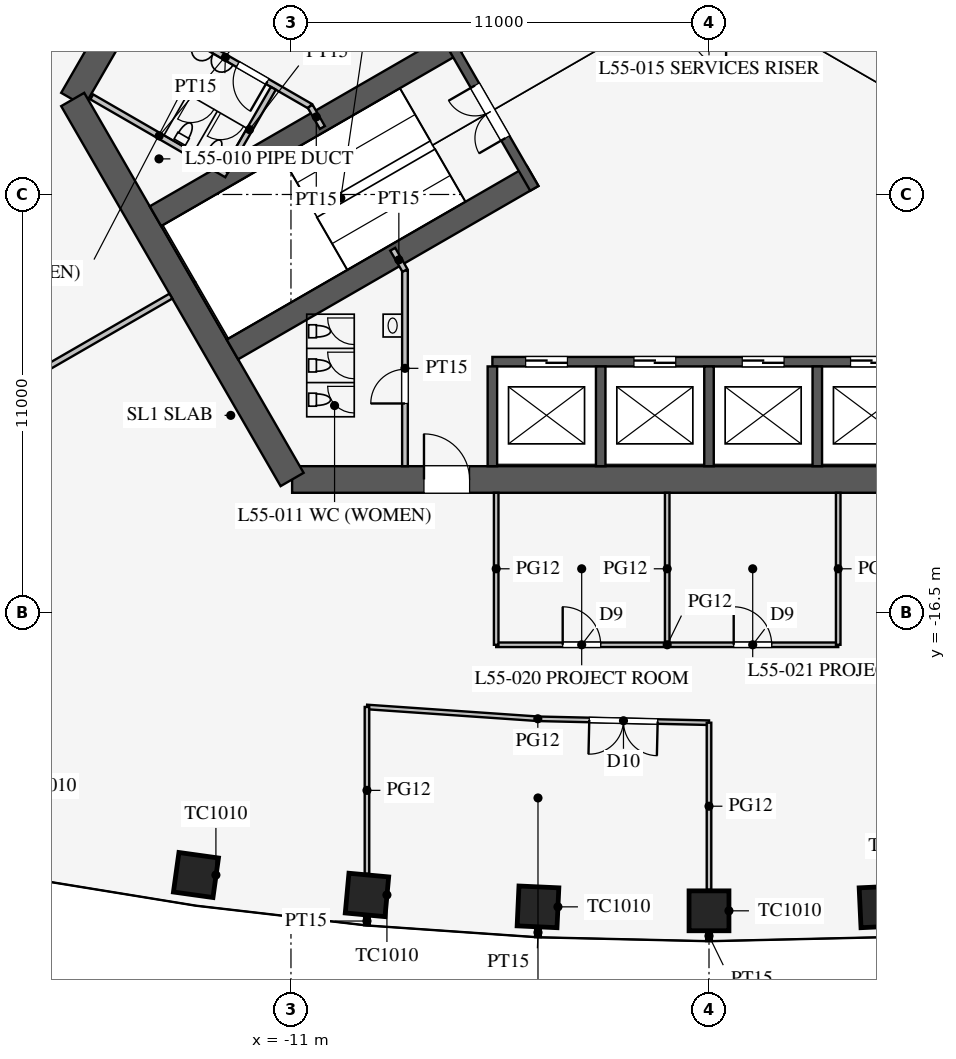
"""IFC4 building model, lengths in metres.
Left out: names, types, materials, properties, quantities, classifications, styles, units other than length and angle.
Written with IfcOpenShell. Run it as: python <this file> out.ifc"""

import sys

from ifc_helpers import new_model, si_unit, direction, frame, frame_2d, origin, origin_2d, place, context, subcontext, project, spatial, rectangle, extrude, element, fill, save


model = new_model("IFC4")
c1 = context("Model", 3, precision=1e-05, world=origin(), true_north=direction((0.0, 1.0)))
c2 = subcontext(c1, "Body", "Model", "MODEL_VIEW")
j1 = project(units=[si_unit("LENGTHUNIT", "METRE"), si_unit("PLANEANGLEUNIT", "RADIAN")], contexts=[c1])
p1 = place(None, origin())
s1 = spatial("IfcSite", under=j1, at=p1, CompositionType="ELEMENT")
p2 = place(p1, origin())
s2 = spatial("IfcBuilding", under=s1, at=p2, CompositionType="ELEMENT")
p3 = place(p2, frame((0.0, 0.0, 240.1)))
s3 = spatial("IfcBuildingStorey", under=s2, at=p3, CompositionType="ELEMENT", Elevation=240.1)
for number, where, z_axis, x_axis in (
    (1, (-13.5, -23.408, 0.0), (0.0, 0.0, 1.0), (0.99, -0.138, 0.0)),
    (2, (-9.0, -23.933, 0.0), (0.0, 0.0, 1.0), (0.996, -0.092, 0.0)),
    (3, (-4.5, -24.246, 0.0), (0.0, 0.0, 1.0), (0.999, -0.046, 0.0)),
    (4, (0.0, -24.351, 0.0), (0.0, 0.0, 1.0), (1.0, 0.0, 0.0)),
    (5, (4.5, -24.246, 0.0), (0.0, 0.0, 1.0), (0.999, 0.046, 0.0)),
):
    element("IfcColumn", number, at=place(p3, frame(where, z_axis=z_axis, x_axis=x_axis)), inside=s3, PredefinedType="COLUMN", context=c2, shape_type="SweptSolid", body=[
        extrude(rectangle(XDim=1.05, YDim=1.05, at=origin_2d()), origin(), (0.0, 0.0, 1.0), 4.2),
    ])
p4 = place(p3, frame((-10.97, -13.0, 0.0), z_axis=(0.0, 0.0, 1.0), x_axis=(1.0, 0.0, 0.0)))
e6 = element("IfcWall", 6, at=p4, inside=s3, PredefinedType="SHEAR", context=c2, shape_type="SweptSolid", body=[
    extrude(rectangle(XDim=21.939, YDim=0.7, at=frame_2d((10.97, 0.0))), origin(), (0.0, 0.0, 1.0), 4.2),
])
p5 = place(p4, frame((17.27, 0.0, 0.0)))
e7 = element("IfcOpeningElement", 7, at=p5, cuts=e6, PredefinedType="OPENING", context=c2, shape_type="SweptSolid", body=[
    extrude(rectangle(XDim=1.2, YDim=2.1, at=frame_2d((0.6, 1.05))), frame((0.0, 0.36, 0.0), z_axis=(0.0, -1.0, 0.0), x_axis=(1.0, 0.0, 0.0)), (0.0, 0.0, 1.0), 0.72),
])
p6 = place(p4, frame((3.47, 0.0, 0.0)))
e8 = element("IfcOpeningElement", 8, at=p6, cuts=e6, PredefinedType="OPENING", context=c2, shape_type="SweptSolid", body=[
    extrude(rectangle(XDim=1.2, YDim=2.1, at=frame_2d((0.6, 1.05))), frame((0.0, 0.36, 0.0), z_axis=(0.0, -1.0, 0.0), x_axis=(1.0, 0.0, 0.0)), (0.0, 0.0, 1.0), 0.72),
])
p7 = place(p3, frame((-5.773, 16.0, 0.0), z_axis=(0.0, 0.0, 1.0), x_axis=(-0.500002442456, -0.866023993627, 0.0)))
e9 = element("IfcWall", 9, at=p7, inside=s3, PredefinedType="SHEAR", context=c2, shape_type="SweptSolid", body=[
    extrude(rectangle(XDim=21.939, YDim=0.7, at=frame_2d((10.97, 0.0))), origin(), (0.0, 0.0, 1.0), 4.2),
])
p8 = place(p7, frame((17.27, 0.0, 0.0)))
e10 = element("IfcOpeningElement", 10, at=p8, cuts=e9, PredefinedType="OPENING", context=c2, shape_type="SweptSolid", body=[
    extrude(rectangle(XDim=1.2, YDim=2.1, at=frame_2d((0.6, 1.05))), frame((0.0, 0.36, 0.0), z_axis=(0.0, -1.0, 0.0), x_axis=(1.0, 0.0, 0.0)), (0.0, 0.0, 1.0), 0.72),
])
p9 = place(p7, frame((3.47, 0.0, 0.0)))
e11 = element("IfcOpeningElement", 11, at=p9, cuts=e9, PredefinedType="OPENING", context=c2, shape_type="SweptSolid", body=[
    extrude(rectangle(XDim=1.2, YDim=2.1, at=frame_2d((0.6, 1.05))), frame((0.0, 0.36, 0.0), z_axis=(0.0, -1.0, 0.0), x_axis=(1.0, 0.0, 0.0)), (0.0, 0.0, 1.0), 0.72),
])
p10 = place(p3, frame((-16.743, -3.0, 0.0), z_axis=(0.0, 0.0, 1.0), x_axis=(0.499995765644, -0.866027848477, 0.0)))
e12 = element("IfcWall", 12, at=p10, inside=s3, PredefinedType="SHEAR", context=c2, shape_type="SweptSolid", body=[
    extrude(rectangle(XDim=11.547, YDim=0.7, at=frame_2d((5.773, 0.0))), origin(), (0.0, 0.0, 1.0), 4.2),
])
p11 = place(p3, frame((-5.7, -9.9, 0.0), z_axis=(0.0, 0.0, 1.0), x_axis=(1.0, 0.0, 0.0)))
e13 = element("IfcWall", 13, at=p11, inside=s3, PredefinedType="SHEAR", context=c2, shape_type="SweptSolid", body=[
    extrude(rectangle(XDim=11.4, YDim=0.25, at=frame_2d((5.7, 0.0))), origin(), (0.0, 0.0, 1.0), 4.2),
])
p12 = place(p11, frame((0.875, 0.0, 0.0)))
e14 = element("IfcOpeningElement", 14, at=p12, cuts=e13, PredefinedType="OPENING", context=c2, shape_type="SweptSolid", body=[
    extrude(rectangle(XDim=1.1, YDim=2.2, at=frame_2d((0.55, 1.1))), frame((0.0, 0.135, 0.0), z_axis=(0.0, -1.0, 0.0), x_axis=(1.0, 0.0, 0.0)), (0.0, 0.0, 1.0), 0.27),
])
p13 = place(p11, frame((3.725, 0.0, 0.0)))
e15 = element("IfcOpeningElement", 15, at=p13, cuts=e13, PredefinedType="OPENING", context=c2, shape_type="SweptSolid", body=[
    extrude(rectangle(XDim=1.1, YDim=2.2, at=frame_2d((0.55, 1.1))), frame((0.0, 0.135, 0.0), z_axis=(0.0, -1.0, 0.0), x_axis=(1.0, 0.0, 0.0)), (0.0, 0.0, 1.0), 0.27),
])
p14 = place(p11, frame((6.575, 0.0, 0.0)))
e16 = element("IfcOpeningElement", 16, at=p14, cuts=e13, PredefinedType="OPENING", context=c2, shape_type="SweptSolid", body=[
    extrude(rectangle(XDim=1.1, YDim=2.2, at=frame_2d((0.55, 1.1))), frame((0.0, 0.135, 0.0), z_axis=(0.0, -1.0, 0.0), x_axis=(1.0, 0.0, 0.0)), (0.0, 0.0, 1.0), 0.27),
])
p15 = place(p11, frame((9.425, 0.0, 0.0)))
e17 = element("IfcOpeningElement", 17, at=p15, cuts=e13, PredefinedType="OPENING", context=c2, shape_type="SweptSolid", body=[
    extrude(rectangle(XDim=1.1, YDim=2.2, at=frame_2d((0.55, 1.1))), frame((0.0, 0.135, 0.0), z_axis=(0.0, -1.0, 0.0), x_axis=(1.0, 0.0, 0.0)), (0.0, 0.0, 1.0), 0.27),
])
for number, where, z_axis, x_axis in (
    (18, (-5.7, -10.025, 0.0), (0.0, 0.0, 1.0), (0.0, -1.0, 0.0)),
    (19, (-2.85, -10.025, 0.0), (0.0, 0.0, 1.0), (0.0, -1.0, 0.0)),
    (20, (0.0, -10.025, 0.0), (0.0, 0.0, 1.0), (0.0, -1.0, 0.0)),
    (21, (2.85, -10.025, 0.0), (0.0, 0.0, 1.0), (0.0, -1.0, 0.0)),
):
    element("IfcWall", number, at=place(p3, frame(where, z_axis=z_axis, x_axis=x_axis)), inside=s3, PredefinedType="SHEAR", context=c2, shape_type="SweptSolid", body=[
        extrude(rectangle(XDim=2.625, YDim=0.25, at=frame_2d((1.312, 0.0))), origin(), (0.0, 0.0, 1.0), 4.2),
    ])
for number, where, z_axis, x_axis in (
    (22, (-6.663, -1.509, 0.0), (0.0, 0.0, 1.0), (-0.866, -0.5, 0.0)),
    (23, (-4.638, -5.016, 0.0), (0.0, 0.0, 1.0), (-0.866, -0.5, 0.0)),
):
    element("IfcWall", number, at=place(p3, frame(where, z_axis=z_axis, x_axis=x_axis)), inside=s3, PredefinedType="SHEAR", context=c2, shape_type="SweptSolid", body=[
        extrude(rectangle(XDim=9.125, YDim=0.6, at=frame_2d((4.562, 0.0))), origin(), (0.0, 0.0, 1.0), 4.2),
    ])
p16 = place(p3, frame((-6.922, -1.312, 0.0), z_axis=(0.0, 0.0, 1.0), x_axis=(0.499984536904, -0.866034331223, 0.0)))
e24 = element("IfcWall", 24, at=p16, inside=s3, PredefinedType="SHEAR", context=c2, shape_type="SweptSolid", body=[
    extrude(rectangle(XDim=4.65, YDim=0.25, at=frame_2d((2.325, 0.0))), origin(), (0.0, 0.0, 1.0), 4.2),
])
p17 = place(p16, frame((1.525, 0.0, 0.0)))
e25 = element("IfcOpeningElement", 25, at=p17, cuts=e24, PredefinedType="OPENING", context=c2, shape_type="SweptSolid", body=[
    extrude(rectangle(XDim=1.6, YDim=2.1, at=frame_2d((0.8, 1.05))), frame((0.0, 0.135, 0.0), z_axis=(0.0, -1.0, 0.0), x_axis=(1.0, 0.0, 0.0)), (0.0, 0.0, 1.0), 0.27),
])
p18 = place(p3, frame((-8.0, -7.5, 0.0), z_axis=(0.0, 0.0, 1.0), x_axis=(0.0, -1.0, 0.0)))
e26 = element("IfcWall", 26, at=p18, inside=s3, PredefinedType="PARTITIONING", context=c2, shape_type="SweptSolid", body=[
    extrude(rectangle(XDim=5.15, YDim=0.15, at=frame_2d((2.575, 0.0))), origin(), (0.0, 0.0, 1.0), 4.0),
])
p19 = place(p18, frame((2.6, 0.0, 0.0)))
e27 = element("IfcOpeningElement", 27, at=p19, cuts=e26, PredefinedType="OPENING", context=c2, shape_type="SweptSolid", body=[
    extrude(rectangle(XDim=0.9, YDim=2.1, at=frame_2d((0.45, 1.05))), frame((0.0, 0.085, 0.0), z_axis=(0.0, -1.0, 0.0), x_axis=(1.0, 0.0, 0.0)), (0.0, 0.0, 1.0), 0.17),
])
p20 = place(p3, frame((-10.495, -3.178, 0.0), z_axis=(0.0, 0.0, 1.0), x_axis=(-0.866037967349, 0.499978238636, 0.0)))
e28 = element("IfcWall", 28, at=p20, inside=s3, PredefinedType="PARTITIONING", context=c2, shape_type="SweptSolid", body=[
    extrude(rectangle(XDim=5.15, YDim=0.15, at=frame_2d((2.575, 0.0))), origin(), (0.0, 0.0, 1.0), 4.0),
])
p21 = place(p20, frame((1.3, 0.0, 0.0)))
e29 = element("IfcOpeningElement", 29, at=p21, cuts=e28, PredefinedType="OPENING", context=c2, shape_type="SweptSolid", body=[
    extrude(rectangle(XDim=0.9, YDim=2.1, at=frame_2d((0.45, 1.05))), frame((0.0, 0.085, 0.0), z_axis=(0.0, -1.0, 0.0), x_axis=(1.0, 0.0, 0.0)), (0.0, 0.0, 1.0), 0.17),
])
for number, where, z_axis, x_axis in (
    (30, (-10.495, -3.178, 0.0), (0.0, 0.0, 1.0), (0.5, -0.866, 0.0)),
    (31, (-8.0, -7.5, 0.0), (0.0, 0.0, 1.0), (-0.5, 0.866, 0.0)),
):
    element("IfcWall", number, at=place(p3, frame(where, z_axis=z_axis, x_axis=x_axis)), inside=s3, PredefinedType="PARTITIONING", context=c2, shape_type="SweptSolid", body=[
        extrude(rectangle(XDim=0.645, YDim=0.15, at=frame_2d((0.323, 0.0))), origin(), (0.0, 0.0, 1.0), 4.0),
    ])
p22 = place(p3, frame((-12.691, -4.982, 0.0), z_axis=(0.0, 0.0, 1.0), x_axis=(-0.8660249478, 0.500000789788, 0.0)))
e32 = element("IfcWall", 32, at=p22, inside=s3, PredefinedType="PARTITIONING", context=c2, shape_type="SweptSolid", body=[
    extrude(rectangle(XDim=4.1, YDim=0.15, at=frame_2d((2.05, 0.0))), origin(), (0.0, 0.0, 1.0), 4.0),
])
p23 = place(p3, frame((-11.464, -2.706, 0.0), z_axis=(0.0, 0.0, 1.0), x_axis=(-0.50001992892, -0.866013897511, 0.0)))
e33 = element("IfcWall", 33, at=p23, inside=s3, PredefinedType="PARTITIONING", context=c2, shape_type="SweptSolid", body=[
    extrude(rectangle(XDim=2.51, YDim=0.15, at=frame_2d((1.255, 0.0))), origin(), (0.0, 0.0, 1.0), 4.0),
])
p24 = place(p3, frame((-14.159, -8.175, 0.0), z_axis=(0.0, 0.0, 1.0), x_axis=(-0.866027028085, -0.499997186618, 0.0)))
e34 = element("IfcWall", 34, at=p24, inside=s3, PredefinedType="PARTITIONING", context=c2, shape_type="SweptSolid", body=[
    extrude(rectangle(XDim=15.0, YDim=0.15, at=frame_2d((7.5, 0.0))), origin(), (0.0, 0.0, 1.0), 2.4),
])
p25 = place(p3, frame((-1.1, -17.35, 0.0), z_axis=(0.0, 0.0, 1.0), x_axis=(1.0, 0.0, 0.0)))
e35 = element("IfcWall", 35, at=p25, inside=s3, PredefinedType="PARTITIONING", context=c2, shape_type="SweptSolid", body=[
    extrude(rectangle(XDim=4.5, YDim=0.12, at=frame_2d((2.25, 0.0))), origin(), (0.0, 0.0, 1.0), 2.9),
])
p26 = place(p25, frame((1.75, 0.0, 0.15)))
e36 = element("IfcOpeningElement", 36, at=p26, cuts=e35, PredefinedType="OPENING", context=c2, shape_type="SweptSolid", body=[
    extrude(rectangle(XDim=1.0, YDim=2.1, at=frame_2d((0.5, 1.05))), frame((0.0, 0.07, 0.0), z_axis=(0.0, -1.0, 0.0), x_axis=(1.0, 0.0, 0.0)), (0.0, 0.0, 1.0), 0.14),
])
p27 = place(p3, frame((-5.6, -17.35, 0.0), z_axis=(0.0, 0.0, 1.0), x_axis=(1.0, 0.0, 0.0)))
e37 = element("IfcWall", 37, at=p27, inside=s3, PredefinedType="PARTITIONING", context=c2, shape_type="SweptSolid", body=[
    extrude(rectangle(XDim=4.5, YDim=0.12, at=frame_2d((2.25, 0.0))), origin(), (0.0, 0.0, 1.0), 2.9),
])
p28 = place(p27, frame((1.75, 0.0, 0.15)))
e38 = element("IfcOpeningElement", 38, at=p28, cuts=e37, PredefinedType="OPENING", context=c2, shape_type="SweptSolid", body=[
    extrude(rectangle(XDim=1.0, YDim=2.1, at=frame_2d((0.5, 1.05))), frame((0.0, 0.07, 0.0), z_axis=(0.0, -1.0, 0.0), x_axis=(1.0, 0.0, 0.0)), (0.0, 0.0, 1.0), 0.14),
])
for number, where, z_axis, x_axis in (
    (39, (3.4, -13.35, 0.0), (0.0, 0.0, 1.0), (0.0, -1.0, 0.0)),
    (40, (-1.1, -13.35, 0.0), (0.0, 0.0, 1.0), (0.0, -1.0, 0.0)),
    (41, (-5.6, -13.35, 0.0), (0.0, 0.0, 1.0), (0.0, -1.0, 0.0)),
):
    element("IfcWall", number, at=place(p3, frame(where, z_axis=z_axis, x_axis=x_axis)), inside=s3, PredefinedType="PARTITIONING", context=c2, shape_type="SweptSolid", body=[
        extrude(rectangle(XDim=4.0, YDim=0.12, at=frame_2d((2.0, 0.0))), origin(), (0.0, 0.0, 1.0), 2.9),
    ])
p29 = place(p3, frame((0.0, -24.88, 0.0), z_axis=(0.0, 0.0, 1.0), x_axis=(0.0, -1.0, 0.0)))
e42 = element("IfcWall", 42, at=p29, inside=s3, PredefinedType="PARTITIONING", context=c2, shape_type="SweptSolid", body=[
    extrude(rectangle(XDim=0.266, YDim=0.15, at=frame_2d((0.133, 0.0))), origin(), (0.0, 0.0, 1.0), 2.9),
])
p30 = place(p3, frame((-4.5, -24.799, 0.0), z_axis=(0.0, 0.0, 1.0), x_axis=(0.0, -1.0, 0.0)))
e43 = element("IfcWall", 43, at=p30, inside=s3, PredefinedType="PARTITIONING", context=c2, shape_type="SweptSolid", body=[
    extrude(rectangle(XDim=0.243, YDim=0.15, at=frame_2d((0.122, 0.0))), origin(), (0.0, 0.0, 1.0), 2.9),
])
p31 = place(p3, frame((-9.0, -24.508, 0.0), z_axis=(0.0, 0.0, 1.0), x_axis=(0.0, -1.0, 0.0)))
e44 = element("IfcWall", 44, at=p31, inside=s3, PredefinedType="PARTITIONING", context=c2, shape_type="SweptSolid", body=[
    extrude(rectangle(XDim=0.223, YDim=0.15, at=frame_2d((0.112, 0.0))), origin(), (0.0, 0.0, 1.0), 2.9),
])
p32 = place(p3, frame((-4.5, -19.297, 0.0), z_axis=(0.0, 0.0, 1.0), x_axis=(0.99973552509, -0.022997388381, 0.0)))
e45 = element("IfcWall", 45, at=p32, inside=s3, PredefinedType="PARTITIONING", context=c2, shape_type="SweptSolid", body=[
    extrude(rectangle(XDim=4.501, YDim=0.12, at=frame_2d((2.25, 0.0))), origin(), (0.0, 0.0, 1.0), 2.9),
])
p33 = place(p32, frame((1.35, 0.0, 0.15)))
e46 = element("IfcOpeningElement", 46, at=p33, cuts=e45, PredefinedType="OPENING", context=c2, shape_type="SweptSolid", body=[
    extrude(rectangle(XDim=1.8, YDim=2.1, at=frame_2d((0.9, 1.05))), frame((0.0, 0.07, 0.0), z_axis=(0.0, -1.0, 0.0), x_axis=(1.0, 0.0, 0.0)), (0.0, 0.0, 1.0), 0.14),
])
p34 = place(p3, frame((-9.0, -18.986, 0.0), z_axis=(0.0, 0.0, 1.0), x_axis=(0.997623533978, -0.068900540297, 0.0)))
e47 = element("IfcWall", 47, at=p34, inside=s3, PredefinedType="PARTITIONING", context=c2, shape_type="SweptSolid", body=[
    extrude(rectangle(XDim=4.511, YDim=0.12, at=frame_2d((2.255, 0.0))), origin(), (0.0, 0.0, 1.0), 2.9),
])
p35 = place(p3, frame((0.0, -19.401, 0.0), z_axis=(0.0, 0.0, 1.0), x_axis=(0.0, -1.0, 0.0)))
e48 = element("IfcWall", 48, at=p35, inside=s3, PredefinedType="PARTITIONING", context=c2, shape_type="SweptSolid", body=[
    extrude(rectangle(XDim=4.395, YDim=0.12, at=frame_2d((2.198, 0.0))), origin(), (0.0, 0.0, 1.0), 2.9),
])
p36 = place(p3, frame((-9.0, -18.986, 0.0), z_axis=(0.0, 0.0, 1.0), x_axis=(0.0, -1.0, 0.0)))
e49 = element("IfcWall", 49, at=p36, inside=s3, PredefinedType="PARTITIONING", context=c2, shape_type="SweptSolid", body=[
    extrude(rectangle(XDim=4.389, YDim=0.12, at=frame_2d((2.195, 0.0))), origin(), (0.0, 0.0, 1.0), 2.9),
])
p37 = place(p3, frame((26.328, -15.182, 0.0), z_axis=(0.0, 0.0, 1.0), x_axis=(-0.500000626146, 0.866025042278, 0.0)))
e50 = element("IfcWall", 50, at=p37, inside=s3, PredefinedType="PARTITIONING", context=c2, shape_type="SweptSolid", body=[
    extrude(rectangle(XDim=52.624, YDim=0.12, at=frame_2d((26.312, 0.0))), origin(), (0.0, 0.0, 1.0), 2.9),
])
p38 = place(p37, frame((10.15, 0.0, 0.15)))
e51 = element("IfcOpeningElement", 51, at=p38, cuts=e50, PredefinedType="OPENING", context=c2, shape_type="SweptSolid", body=[
    extrude(rectangle(XDim=1.8, YDim=2.1, at=frame_2d((0.9, 1.05))), frame((0.0, 0.07, 0.0), z_axis=(0.0, -1.0, 0.0), x_axis=(1.0, 0.0, 0.0)), (0.0, 0.0, 1.0), 0.14),
])
p39 = place(p37, frame((40.65, 0.0, 0.15)))
e52 = element("IfcOpeningElement", 52, at=p39, cuts=e50, PredefinedType="OPENING", context=c2, shape_type="SweptSolid", body=[
    extrude(rectangle(XDim=1.8, YDim=2.1, at=frame_2d((0.9, 1.05))), frame((0.0, 0.07, 0.0), z_axis=(0.0, -1.0, 0.0), x_axis=(1.0, 0.0, 0.0)), (0.0, 0.0, 1.0), 0.14),
])
p40 = place(p3, frame((-0.016, 30.392, 0.0), z_axis=(0.0, 0.0, 1.0), x_axis=(-0.500000626146, -0.866025042278, 0.0)))
e53 = element("IfcWall", 53, at=p40, inside=s3, PredefinedType="PARTITIONING", context=c2, shape_type="SweptSolid", body=[
    extrude(rectangle(XDim=52.624, YDim=0.12, at=frame_2d((26.312, 0.0))), origin(), (0.0, 0.0, 1.0), 2.9),
])
p41 = place(p40, frame((10.15, 0.0, 0.15)))
e54 = element("IfcOpeningElement", 54, at=p41, cuts=e53, PredefinedType="OPENING", context=c2, shape_type="SweptSolid", body=[
    extrude(rectangle(XDim=1.8, YDim=2.1, at=frame_2d((0.9, 1.05))), frame((0.0, 0.07, 0.0), z_axis=(0.0, -1.0, 0.0), x_axis=(1.0, 0.0, 0.0)), (0.0, 0.0, 1.0), 0.14),
])
p42 = place(p40, frame((40.65, 0.0, 0.15)))
e55 = element("IfcOpeningElement", 55, at=p42, cuts=e53, PredefinedType="OPENING", context=c2, shape_type="SweptSolid", body=[
    extrude(rectangle(XDim=1.8, YDim=2.1, at=frame_2d((0.9, 1.05))), frame((0.0, 0.07, 0.0), z_axis=(0.0, -1.0, 0.0), x_axis=(1.0, 0.0, 0.0)), (0.0, 0.0, 1.0), 0.14),
])
p43 = place(p19, frame((0.9, 0.0, 0.0), z_axis=(0.0, 0.0, 1.0), x_axis=(-1.0, 0.0, 0.0)))
e56 = element("IfcDoor", 56, at=p43, inside=s3, OperationType="SINGLE_SWING_LEFT", PredefinedType="DOOR", context=c2, shape_type="SweptSolid", body=[
    extrude(rectangle(XDim=0.9, YDim=2.1, at=frame_2d((0.45, 1.05))), frame((0.0, 0.025, 0.0), z_axis=(0.0, -1.0, 0.0), x_axis=(1.0, 0.0, 0.0)), (0.0, 0.0, 1.0), 0.05),
])
fill(e27, e56)
p44 = place(p21, origin())
e57 = element("IfcDoor", 57, at=p44, inside=s3, OperationType="SINGLE_SWING_LEFT", PredefinedType="DOOR", context=c2, shape_type="SweptSolid", body=[
    extrude(rectangle(XDim=0.9, YDim=2.1, at=frame_2d((0.45, 1.05))), frame((0.0, 0.025, 0.0), z_axis=(0.0, -1.0, 0.0), x_axis=(1.0, 0.0, 0.0)), (0.0, 0.0, 1.0), 0.05),
])
fill(e29, e57)
p45 = place(p17, frame((1.6, 0.0, 0.0), z_axis=(0.0, 0.0, 1.0), x_axis=(-1.0, 0.0, 0.0)))
e58 = element("IfcDoor", 58, at=p45, inside=s3, OperationType="DOUBLE_DOOR_SINGLE_SWING", PredefinedType="DOOR", context=c2, shape_type="SweptSolid", body=[
    extrude(rectangle(XDim=1.6, YDim=2.1, at=frame_2d((0.8, 1.05))), frame((0.0, 0.025, 0.0), z_axis=(0.0, -1.0, 0.0), x_axis=(1.0, 0.0, 0.0)), (0.0, 0.0, 1.0), 0.05),
])
fill(e25, e58)
p46 = place(p6, origin())
e59 = element("IfcDoor", 59, at=p46, inside=s3, OperationType="SINGLE_SWING_LEFT", PredefinedType="DOOR", context=c2, shape_type="SweptSolid", body=[
    extrude(rectangle(XDim=1.2, YDim=2.1, at=frame_2d((0.6, 1.05))), frame((0.0, 0.025, 0.0), z_axis=(0.0, -1.0, 0.0), x_axis=(1.0, 0.0, 0.0)), (0.0, 0.0, 1.0), 0.05),
])
fill(e8, e59)
p47 = place(p28, origin())
e60 = element("IfcDoor", 60, at=p47, inside=s3, OperationType="SINGLE_SWING_LEFT", PredefinedType="DOOR", context=c2, shape_type="SweptSolid", body=[
    extrude(rectangle(XDim=1.0, YDim=2.1, at=frame_2d((0.5, 1.05))), frame((0.0, 0.025, 0.0), z_axis=(0.0, -1.0, 0.0), x_axis=(1.0, 0.0, 0.0)), (0.0, 0.0, 1.0), 0.05),
])
fill(e38, e60)
p48 = place(p26, origin())
e61 = element("IfcDoor", 61, at=p48, inside=s3, OperationType="SINGLE_SWING_LEFT", PredefinedType="DOOR", context=c2, shape_type="SweptSolid", body=[
    extrude(rectangle(XDim=1.0, YDim=2.1, at=frame_2d((0.5, 1.05))), frame((0.0, 0.025, 0.0), z_axis=(0.0, -1.0, 0.0), x_axis=(1.0, 0.0, 0.0)), (0.0, 0.0, 1.0), 0.05),
])
fill(e36, e61)
p49 = place(p33, frame((1.8, 0.0, 0.0), z_axis=(0.0, 0.0, 1.0), x_axis=(-1.0, 0.0, 0.0)))
e62 = element("IfcDoor", 62, at=p49, inside=s3, OperationType="DOUBLE_DOOR_SINGLE_SWING", PredefinedType="DOOR", context=c2, shape_type="SweptSolid", body=[
    extrude(rectangle(XDim=1.8, YDim=2.1, at=frame_2d((0.9, 1.05))), frame((0.0, 0.025, 0.0), z_axis=(0.0, -1.0, 0.0), x_axis=(1.0, 0.0, 0.0)), (0.0, 0.0, 1.0), 0.05),
])
fill(e46, e62)
p50 = place(p12, origin())
e63 = element("IfcDoor", 63, at=p50, inside=s3, OperationType="DOUBLE_DOOR_SLIDING", PredefinedType="DOOR", context=c2, shape_type="SweptSolid", body=[
    extrude(rectangle(XDim=1.1, YDim=2.2, at=frame_2d((0.55, 1.1))), frame((0.0, 0.025, 0.0), z_axis=(0.0, -1.0, 0.0), x_axis=(1.0, 0.0, 0.0)), (0.0, 0.0, 1.0), 0.05),
])
fill(e14, e63)
p51 = place(p13, origin())
e64 = element("IfcDoor", 64, at=p51, inside=s3, OperationType="DOUBLE_DOOR_SLIDING", PredefinedType="DOOR", context=c2, shape_type="SweptSolid", body=[
    extrude(rectangle(XDim=1.1, YDim=2.2, at=frame_2d((0.55, 1.1))), frame((0.0, 0.025, 0.0), z_axis=(0.0, -1.0, 0.0), x_axis=(1.0, 0.0, 0.0)), (0.0, 0.0, 1.0), 0.05),
])
fill(e15, e64)
p52 = place(p14, origin())
e65 = element("IfcDoor", 65, at=p52, inside=s3, OperationType="DOUBLE_DOOR_SLIDING", PredefinedType="DOOR", context=c2, shape_type="SweptSolid", body=[
    extrude(rectangle(XDim=1.1, YDim=2.2, at=frame_2d((0.55, 1.1))), frame((0.0, 0.025, 0.0), z_axis=(0.0, -1.0, 0.0), x_axis=(1.0, 0.0, 0.0)), (0.0, 0.0, 1.0), 0.05),
])
fill(e16, e65)
p53 = place(p15, origin())
e66 = element("IfcDoor", 66, at=p53, inside=s3, OperationType="DOUBLE_DOOR_SLIDING", PredefinedType="DOOR", context=c2, shape_type="SweptSolid", body=[
    extrude(rectangle(XDim=1.1, YDim=2.2, at=frame_2d((0.55, 1.1))), frame((0.0, 0.025, 0.0), z_axis=(0.0, -1.0, 0.0), x_axis=(1.0, 0.0, 0.0)), (0.0, 0.0, 1.0), 0.05),
])
fill(e17, e66)
save(model, sys.argv[1])
